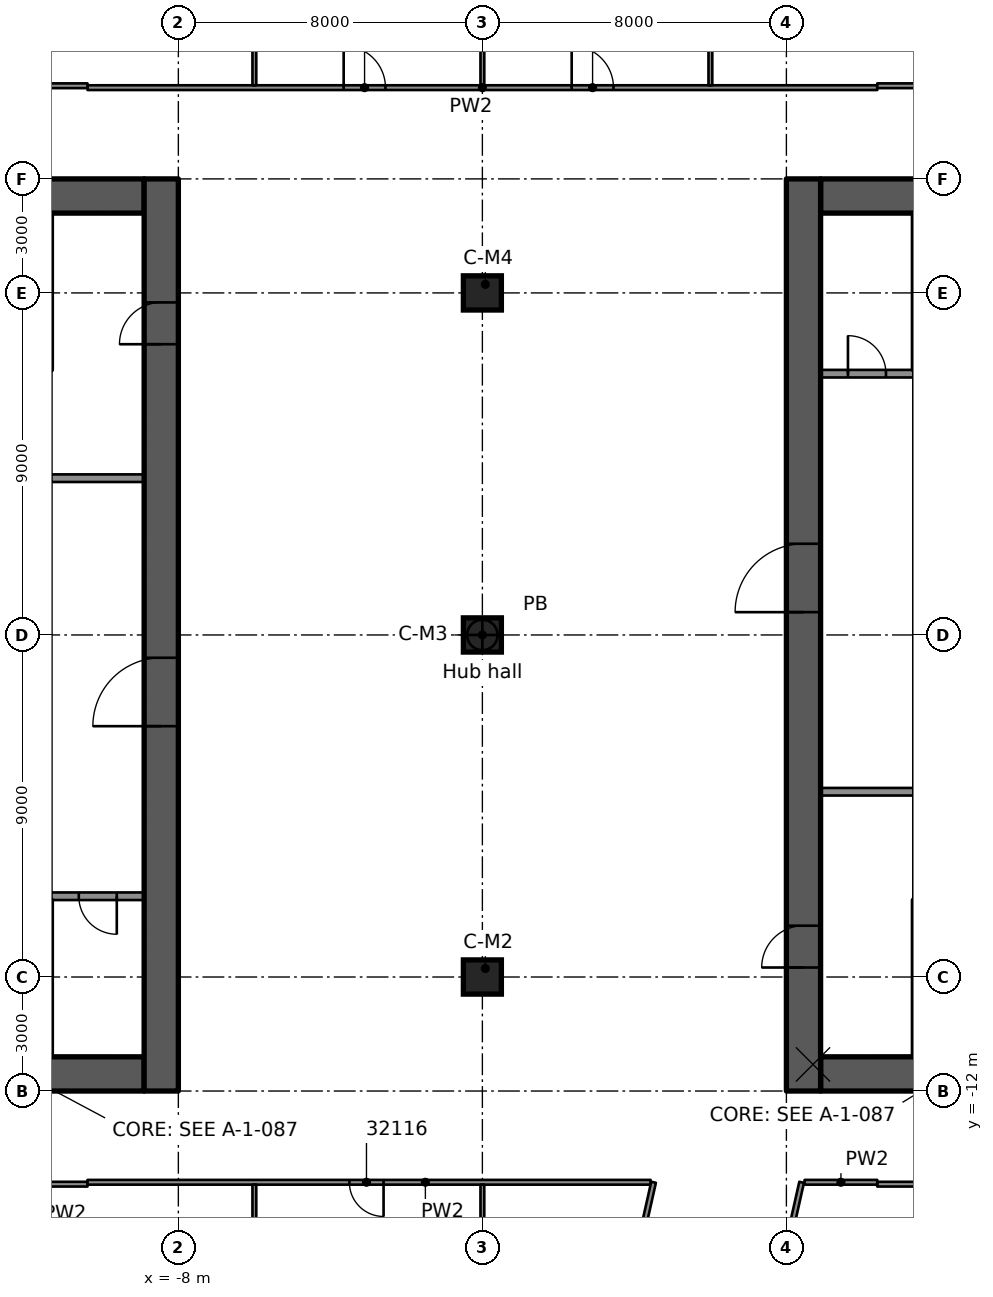
"""IFC4 building model, lengths in metres.
Left out: names, types, materials, properties, quantities, classifications, styles, units other than length and angle.
Written with IfcOpenShell. Run it as: python <this file> out.ifc"""

import sys

from ifc_helpers import new_model, si_unit, direction, frame, frame_2d, origin, origin_2d, place, context, subcontext, project, spatial, rectangle, extrude, element, fill, save


model = new_model("IFC4")
c1 = context("Model", 3, precision=1e-05, world=origin(), true_north=direction((0.0, 1.0)))
c2 = subcontext(c1, "Body", "Model", "MODEL_VIEW")
j1 = project(units=[si_unit("LENGTHUNIT", "METRE"), si_unit("PLANEANGLEUNIT", "RADIAN")], contexts=[c1])
p1 = place(None, origin())
s1 = spatial("IfcSite", under=j1, at=p1, CompositionType="ELEMENT")
p2 = place(p1, origin())
s2 = spatial("IfcBuilding", under=s1, at=p2, CompositionType="ELEMENT")
p3 = place(p2, frame((0.0, 0.0, 159.6)))
s3 = spatial("IfcBuildingStorey", under=s2, at=p3, CompositionType="ELEMENT", Elevation=159.6)
p4 = place(p3, frame((-18.1, 11.55, 0.0), z_axis=(0.0, 0.0, 1.0), x_axis=(1.0, 0.0, 0.0)))
e1 = element("IfcWall", 1, at=p4, inside=s3, PredefinedType="SHEAR", context=c2, shape_type="SweptSolid", body=[
    extrude(rectangle(XDim=9.2, YDim=0.9, at=frame_2d((4.6, 0.0))), origin(), (0.0, 0.0, 1.0), 3.5),
])
p5 = place(p4, frame((5.1, 0.0, 0.0)))
e2 = element("IfcOpeningElement", 2, at=p5, cuts=e1, PredefinedType="OPENING", context=c2, shape_type="SweptSolid", body=[
    extrude(rectangle(XDim=1.1, YDim=2.1, at=frame_2d((0.55, 1.05))), frame((0.0, 0.46, 0.0), z_axis=(0.0, -1.0, 0.0), x_axis=(1.0, 0.0, 0.0)), (0.0, 0.0, 1.0), 0.92),
])
p6 = place(p3, frame((-18.1, -11.55, 0.0), z_axis=(0.0, 0.0, 1.0), x_axis=(1.0, 0.0, 0.0)))
e3 = element("IfcWall", 3, at=p6, inside=s3, PredefinedType="SHEAR", context=c2, shape_type="SweptSolid", body=[
    extrude(rectangle(XDim=9.2, YDim=0.9, at=frame_2d((4.6, 0.0))), origin(), (0.0, 0.0, 1.0), 3.5),
])
p7 = place(p6, frame((5.1, 0.0, 0.0)))
e4 = element("IfcOpeningElement", 4, at=p7, cuts=e3, PredefinedType="OPENING", context=c2, shape_type="SweptSolid", body=[
    extrude(rectangle(XDim=1.1, YDim=2.1, at=frame_2d((0.55, 1.05))), frame((0.0, 0.46, 0.0), z_axis=(0.0, -1.0, 0.0), x_axis=(1.0, 0.0, 0.0)), (0.0, 0.0, 1.0), 0.92),
])
p8 = place(p3, frame((-8.45, -12.0, 0.0), z_axis=(0.0, 0.0, 1.0), x_axis=(0.0, 1.0, 0.0)))
e5 = element("IfcWall", 5, at=p8, inside=s3, PredefinedType="SHEAR", context=c2, shape_type="SweptSolid", body=[
    extrude(rectangle(XDim=24.0, YDim=0.9, at=frame_2d((12.0, 0.0))), origin(), (0.0, 0.0, 1.0), 3.5),
])
p9 = place(p8, frame((9.6, 0.0, 0.0)))
e6 = element("IfcOpeningElement", 6, at=p9, cuts=e5, PredefinedType="OPENING", context=c2, shape_type="SweptSolid", body=[
    extrude(rectangle(XDim=1.8, YDim=2.1, at=frame_2d((0.9, 1.05))), frame((0.0, 0.46, 0.0), z_axis=(0.0, -1.0, 0.0), x_axis=(1.0, 0.0, 0.0)), (0.0, 0.0, 1.0), 0.92),
])
p10 = place(p8, frame((19.65, 0.0, 0.0)))
e7 = element("IfcOpeningElement", 7, at=p10, cuts=e5, PredefinedType="OPENING", context=c2, shape_type="SweptSolid", body=[
    extrude(rectangle(XDim=1.1, YDim=2.1, at=frame_2d((0.55, 1.05))), frame((0.0, 0.46, 0.0), z_axis=(0.0, -1.0, 0.0), x_axis=(1.0, 0.0, 0.0)), (0.0, 0.0, 1.0), 0.92),
])
p11 = place(p3, frame((8.9, 11.55, 0.0), z_axis=(0.0, 0.0, 1.0), x_axis=(1.0, 0.0, 0.0)))
e8 = element("IfcWall", 8, at=p11, inside=s3, PredefinedType="SHEAR", context=c2, shape_type="SweptSolid", body=[
    extrude(rectangle(XDim=9.2, YDim=0.9, at=frame_2d((4.6, 0.0))), origin(), (0.0, 0.0, 1.0), 3.5),
])
p12 = place(p11, frame((3.0, 0.0, 0.0)))
e9 = element("IfcOpeningElement", 9, at=p12, cuts=e8, PredefinedType="OPENING", context=c2, shape_type="SweptSolid", body=[
    extrude(rectangle(XDim=1.1, YDim=2.1, at=frame_2d((0.55, 1.05))), frame((0.0, 0.46, 0.0), z_axis=(0.0, -1.0, 0.0), x_axis=(1.0, 0.0, 0.0)), (0.0, 0.0, 1.0), 0.92),
])
p13 = place(p3, frame((8.9, -11.55, 0.0), z_axis=(0.0, 0.0, 1.0), x_axis=(1.0, 0.0, 0.0)))
e10 = element("IfcWall", 10, at=p13, inside=s3, PredefinedType="SHEAR", context=c2, shape_type="SweptSolid", body=[
    extrude(rectangle(XDim=9.2, YDim=0.9, at=frame_2d((4.6, 0.0))), origin(), (0.0, 0.0, 1.0), 3.5),
])
p14 = place(p13, frame((3.0, 0.0, 0.0)))
e11 = element("IfcOpeningElement", 11, at=p14, cuts=e10, PredefinedType="OPENING", context=c2, shape_type="SweptSolid", body=[
    extrude(rectangle(XDim=1.1, YDim=2.1, at=frame_2d((0.55, 1.05))), frame((0.0, 0.46, 0.0), z_axis=(0.0, -1.0, 0.0), x_axis=(1.0, 0.0, 0.0)), (0.0, 0.0, 1.0), 0.92),
])
p15 = place(p3, frame((8.45, -12.0, 0.0), z_axis=(0.0, 0.0, 1.0), x_axis=(0.0, 1.0, 0.0)))
e12 = element("IfcWall", 12, at=p15, inside=s3, PredefinedType="SHEAR", context=c2, shape_type="SweptSolid", body=[
    extrude(rectangle(XDim=24.0, YDim=0.9, at=frame_2d((12.0, 0.0))), origin(), (0.0, 0.0, 1.0), 3.5),
])
p16 = place(p15, frame((12.6, 0.0, 0.0)))
e13 = element("IfcOpeningElement", 13, at=p16, cuts=e12, PredefinedType="OPENING", context=c2, shape_type="SweptSolid", body=[
    extrude(rectangle(XDim=1.8, YDim=2.1, at=frame_2d((0.9, 1.05))), frame((0.0, 0.46, 0.0), z_axis=(0.0, -1.0, 0.0), x_axis=(1.0, 0.0, 0.0)), (0.0, 0.0, 1.0), 0.92),
])
p17 = place(p15, frame((3.25, 0.0, 0.0)))
e14 = element("IfcOpeningElement", 14, at=p17, cuts=e12, PredefinedType="OPENING", context=c2, shape_type="SweptSolid", body=[
    extrude(rectangle(XDim=1.1, YDim=2.1, at=frame_2d((0.55, 1.05))), frame((0.0, 0.46, 0.0), z_axis=(0.0, -1.0, 0.0), x_axis=(1.0, 0.0, 0.0)), (0.0, 0.0, 1.0), 0.92),
])
for number, where, z_axis, x_axis in (
    (15, (0.0, -9.0, 0.0), (0.0, 0.0, 1.0), (1.0, 0.0, 0.0)),
    (16, (0.0, 0.0, 0.0), (0.0, 0.0, 1.0), (1.0, 0.0, 0.0)),
    (17, (0.0, 9.0, 0.0), (0.0, 0.0, 1.0), (1.0, 0.0, 0.0)),
):
    element("IfcColumn", number, at=place(p3, frame(where, z_axis=z_axis, x_axis=x_axis)), inside=s3, PredefinedType="COLUMN", context=c2, shape_type="SweptSolid", body=[
        extrude(rectangle(XDim=1.0, YDim=0.9, at=origin_2d()), origin(), (0.0, 0.0, 1.0), 3.5),
    ])
p18 = place(p3, frame((-8.9, 4.125, 0.0), z_axis=(0.0, 0.0, 1.0), x_axis=(-1.0, 0.0, 0.0)))
e18 = element("IfcWall", 18, at=p18, inside=s3, PredefinedType="PARTITIONING", context=c2, shape_type="SweptSolid", body=[
    extrude(rectangle(XDim=2.44, YDim=0.2, at=frame_2d((1.22, 0.0))), origin(), (0.0, 0.0, 1.0), 3.09),
])
p19 = place(p3, frame((-8.9, -6.875, 0.0), z_axis=(0.0, 0.0, 1.0), x_axis=(-1.0, 0.0, 0.0)))
e19 = element("IfcWall", 19, at=p19, inside=s3, PredefinedType="PARTITIONING", context=c2, shape_type="SweptSolid", body=[
    extrude(rectangle(XDim=2.44, YDim=0.2, at=frame_2d((1.22, 0.0))), origin(), (0.0, 0.0, 1.0), 3.09),
])
p20 = place(p19, frame((0.72, 0.0, 0.0)))
e20 = element("IfcOpeningElement", 20, at=p20, cuts=e19, PredefinedType="OPENING", context=c2, shape_type="SweptSolid", body=[
    extrude(rectangle(XDim=1.0, YDim=2.1, at=frame_2d((0.5, 1.05))), frame((0.0, 0.11, 0.0), z_axis=(0.0, -1.0, 0.0), x_axis=(1.0, 0.0, 0.0)), (0.0, 0.0, 1.0), 0.22),
])
p21 = place(p3, frame((8.9, -4.125, 0.0), z_axis=(0.0, 0.0, 1.0), x_axis=(1.0, 0.0, 0.0)))
e21 = element("IfcWall", 21, at=p21, inside=s3, PredefinedType="PARTITIONING", context=c2, shape_type="SweptSolid", body=[
    extrude(rectangle(XDim=2.44, YDim=0.2, at=frame_2d((1.22, 0.0))), origin(), (0.0, 0.0, 1.0), 3.09),
])
p22 = place(p3, frame((8.9, 6.875, 0.0), z_axis=(0.0, 0.0, 1.0), x_axis=(1.0, 0.0, 0.0)))
e22 = element("IfcWall", 22, at=p22, inside=s3, PredefinedType="PARTITIONING", context=c2, shape_type="SweptSolid", body=[
    extrude(rectangle(XDim=2.44, YDim=0.2, at=frame_2d((1.22, 0.0))), origin(), (0.0, 0.0, 1.0), 3.09),
])
p23 = place(p22, frame((0.72, 0.0, 0.0)))
e23 = element("IfcOpeningElement", 23, at=p23, cuts=e22, PredefinedType="OPENING", context=c2, shape_type="SweptSolid", body=[
    extrude(rectangle(XDim=1.0, YDim=2.1, at=frame_2d((0.5, 1.05))), frame((0.0, 0.11, 0.0), z_axis=(0.0, -1.0, 0.0), x_axis=(1.0, 0.0, 0.0)), (0.0, 0.0, 1.0), 0.22),
])
p24 = place(p3, frame((-10.391, -14.451, 0.0), z_axis=(0.0, 0.0, 1.0), x_axis=(-1.0, 0.0, 0.0)))
e24 = element("IfcWall", 24, at=p24, inside=s3, PredefinedType="PARTITIONING", context=c2, shape_type="SweptSolid", body=[
    extrude(rectangle(XDim=5.043, YDim=0.125, at=frame_2d((2.521, 0.0))), origin(), (0.0, 0.0, 1.0), 3.08),
])
p25 = place(p24, frame((2.1, 0.0, 0.0)))
e25 = element("IfcOpeningElement", 25, at=p25, cuts=e24, PredefinedType="OPENING", context=c2, shape_type="SweptSolid", body=[
    extrude(rectangle(XDim=0.9, YDim=2.1, at=frame_2d((0.45, 1.05))), frame((0.0, 0.073, 0.0), z_axis=(0.0, -1.0, 0.0), x_axis=(1.0, 0.0, 0.0)), (0.0, 0.0, 1.0), 0.145),
])
p26 = place(p3, frame((21.387, -14.451, 0.0), z_axis=(0.0, 0.0, 1.0), x_axis=(-1.0, 0.0, 0.0)))
e26 = element("IfcWall", 26, at=p26, inside=s3, PredefinedType="PARTITIONING", context=c2, shape_type="SweptSolid", body=[
    extrude(rectangle(XDim=10.996, YDim=0.125, at=frame_2d((5.498, 0.0))), origin(), (0.0, 0.0, 1.0), 3.08),
])
p27 = place(p26, frame((5.238, 0.0, 0.0)))
e27 = element("IfcOpeningElement", 27, at=p27, cuts=e26, PredefinedType="OPENING", context=c2, shape_type="SweptSolid", body=[
    extrude(rectangle(XDim=1.8, YDim=2.1, at=frame_2d((0.9, 1.05))), frame((0.0, 0.073, 0.0), z_axis=(0.0, -1.0, 0.0), x_axis=(1.0, 0.0, 0.0)), (0.0, 0.0, 1.0), 0.145),
])
p28 = place(p3, frame((4.427, -14.401, 0.0), z_axis=(0.0, 0.0, 1.0), x_axis=(-1.0, 0.0, 0.0)))
e28 = element("IfcWall", 28, at=p28, inside=s3, PredefinedType="PARTITIONING", context=c2, shape_type="SweptSolid", body=[
    extrude(rectangle(XDim=14.817, YDim=0.125, at=frame_2d((7.408, 0.0))), origin(), (0.0, 0.0, 1.0), 3.08),
])
p29 = place(p28, frame((7.027, 0.0, 0.0)))
e29 = element("IfcOpeningElement", 29, at=p29, cuts=e28, PredefinedType="OPENING", context=c2, shape_type="SweptSolid", body=[
    extrude(rectangle(XDim=0.9, YDim=2.1, at=frame_2d((0.45, 1.05))), frame((0.0, 0.073, 0.0), z_axis=(0.0, -1.0, 0.0), x_axis=(1.0, 0.0, 0.0)), (0.0, 0.0, 1.0), 0.145),
])
p30 = place(p3, frame((8.479, -14.401, 0.0), z_axis=(0.0, 0.0, 1.0), x_axis=(1.0, 0.0, 0.0)))
e30 = element("IfcWall", 30, at=p30, inside=s3, PredefinedType="PARTITIONING", context=c2, shape_type="SweptSolid", body=[
    extrude(rectangle(XDim=1.912, YDim=0.125, at=frame_2d((0.956, 0.0))), origin(), (0.0, 0.0, 1.0), 3.08),
])
p31 = place(p3, frame((-10.39, 14.401, 0.0), z_axis=(0.0, 0.0, 1.0), x_axis=(1.0, 0.0, 0.0)))
e31 = element("IfcWall", 31, at=p31, inside=s3, PredefinedType="PARTITIONING", context=c2, shape_type="SweptSolid", body=[
    extrude(rectangle(XDim=20.781, YDim=0.125, at=frame_2d((10.391, 0.0))), origin(), (0.0, 0.0, 1.0), 3.08),
])
p32 = place(p31, frame((12.74, 0.0, 0.0)))
e32 = element("IfcOpeningElement", 32, at=p32, cuts=e31, PredefinedType="OPENING", context=c2, shape_type="SweptSolid", body=[
    extrude(rectangle(XDim=1.1, YDim=2.1, at=frame_2d((0.55, 1.05))), frame((0.0, 0.073, 0.0), z_axis=(0.0, -1.0, 0.0), x_axis=(1.0, 0.0, 0.0)), (0.0, 0.0, 1.0), 0.145),
])
p33 = place(p31, frame((6.74, 0.0, 0.0)))
e33 = element("IfcOpeningElement", 33, at=p33, cuts=e31, PredefinedType="OPENING", context=c2, shape_type="SweptSolid", body=[
    extrude(rectangle(XDim=1.1, YDim=2.1, at=frame_2d((0.55, 1.05))), frame((0.0, 0.073, 0.0), z_axis=(0.0, -1.0, 0.0), x_axis=(1.0, 0.0, 0.0)), (0.0, 0.0, 1.0), 0.145),
])
p34 = place(p3, frame((-21.387, 14.451, 0.0), z_axis=(0.0, 0.0, 1.0), x_axis=(1.0, 0.0, 0.0)))
e34 = element("IfcWall", 34, at=p34, inside=s3, PredefinedType="PARTITIONING", context=c2, shape_type="SweptSolid", body=[
    extrude(rectangle(XDim=10.996, YDim=0.125, at=frame_2d((5.498, 0.0))), origin(), (0.0, 0.0, 1.0), 3.08),
])
p35 = place(p34, frame((5.238, 0.0, 0.0)))
e35 = element("IfcOpeningElement", 35, at=p35, cuts=e34, PredefinedType="OPENING", context=c2, shape_type="SweptSolid", body=[
    extrude(rectangle(XDim=1.8, YDim=2.1, at=frame_2d((0.9, 1.05))), frame((0.0, 0.073, 0.0), z_axis=(0.0, -1.0, 0.0), x_axis=(1.0, 0.0, 0.0)), (0.0, 0.0, 1.0), 0.145),
])
p36 = place(p3, frame((10.391, 14.451, 0.0), z_axis=(0.0, 0.0, 1.0), x_axis=(1.0, 0.0, 0.0)))
e36 = element("IfcWall", 36, at=p36, inside=s3, PredefinedType="PARTITIONING", context=c2, shape_type="SweptSolid", body=[
    extrude(rectangle(XDim=10.996, YDim=0.125, at=frame_2d((5.498, 0.0))), origin(), (0.0, 0.0, 1.0), 3.08),
])
p37 = place(p36, frame((3.85, 0.0, 0.0)))
e37 = element("IfcOpeningElement", 37, at=p37, cuts=e36, PredefinedType="OPENING", context=c2, shape_type="SweptSolid", body=[
    extrude(rectangle(XDim=1.8, YDim=2.1, at=frame_2d((0.9, 1.05))), frame((0.0, 0.073, 0.0), z_axis=(0.0, -1.0, 0.0), x_axis=(1.0, 0.0, 0.0)), (0.0, 0.0, 1.0), 0.145),
])
p38 = place(p3, frame((8.401, -14.401, 0.0), z_axis=(0.0, 0.0, 1.0), x_axis=(-0.218995507843, -0.975725867006, 0.0)))
e38 = element("IfcWall", 38, at=p38, inside=s3, PredefinedType="PARTITIONING", context=c2, shape_type="SweptSolid", body=[
    extrude(rectangle(XDim=10.963, YDim=0.125, at=frame_2d((5.481, 0.0))), origin(), (0.0, 0.0, 1.0), 3.08),
])
p39 = place(p3, frame((3.86, -17.274, 0.0), z_axis=(0.0, 0.0, 1.0), x_axis=(0.218975515368, 0.975730353976, 0.0)))
e39 = element("IfcWall", 39, at=p39, inside=s3, PredefinedType="PARTITIONING", context=c2, shape_type="SweptSolid", body=[
    extrude(rectangle(XDim=2.945, YDim=0.125, at=frame_2d((1.472, 0.0))), origin(), (0.0, 0.0, 1.0), 3.08),
])
p40 = place(p3, frame((6.0, 14.463, 0.0), z_axis=(0.0, 0.0, 1.0), x_axis=(0.0, 1.0, 0.0)))
e40 = element("IfcWall", 40, at=p40, inside=s3, PredefinedType="PARTITIONING", context=c2, shape_type="SweptSolid", body=[
    extrude(rectangle(XDim=15.187, YDim=0.1, at=frame_2d((7.594, 0.0))), origin(), (0.0, 0.0, 1.0), 3.08),
])
p41 = place(p3, frame((0.0, -32.297, 0.0), z_axis=(0.0, 0.0, 1.0), x_axis=(0.0, 1.0, 0.0)))
e41 = element("IfcWall", 41, at=p41, inside=s3, PredefinedType="PARTITIONING", context=c2, shape_type="SweptSolid", body=[
    extrude(rectangle(XDim=17.834, YDim=0.1, at=frame_2d((8.917, 0.0))), origin(), (0.0, 0.0, 1.0), 2.445),
])
p42 = place(p3, frame((0.0, 14.463, 0.0), z_axis=(0.0, 0.0, 1.0), x_axis=(0.0, 1.0, 0.0)))
e42 = element("IfcWall", 42, at=p42, inside=s3, PredefinedType="PARTITIONING", context=c2, shape_type="SweptSolid", body=[
    extrude(rectangle(XDim=16.353, YDim=0.1, at=frame_2d((8.177, 0.0))), origin(), (0.0, 0.0, 1.0), 2.445),
])
p43 = place(p3, frame((-6.0, -30.29, 0.0), z_axis=(0.0, 0.0, 1.0), x_axis=(0.0, 1.0, 0.0)))
e43 = element("IfcWall", 43, at=p43, inside=s3, PredefinedType="PARTITIONING", context=c2, shape_type="SweptSolid", body=[
    extrude(rectangle(XDim=15.827, YDim=0.1, at=frame_2d((7.914, 0.0))), origin(), (0.0, 0.0, 1.0), 3.08),
])
p44 = place(p3, frame((-6.0, 14.463, 0.0), z_axis=(0.0, 0.0, 1.0), x_axis=(0.0, 1.0, 0.0)))
e44 = element("IfcWall", 44, at=p44, inside=s3, PredefinedType="PARTITIONING", context=c2, shape_type="SweptSolid", body=[
    extrude(rectangle(XDim=17.519, YDim=0.1, at=frame_2d((8.76, 0.0))), origin(), (0.0, 0.0, 1.0), 2.445),
])
p45 = place(p9, origin())
e45 = element("IfcDoor", 45, at=p45, inside=s3, OperationType="SINGLE_SWING_LEFT", PredefinedType="DOOR", context=c2, shape_type="SweptSolid", body=[
    extrude(rectangle(XDim=1.8, YDim=2.1, at=frame_2d((0.9, 1.05))), frame((0.0, 0.025, 0.0), z_axis=(0.0, -1.0, 0.0), x_axis=(1.0, 0.0, 0.0)), (0.0, 0.0, 1.0), 0.05),
])
fill(e6, e45)
p46 = place(p10, origin())
e46 = element("IfcDoor", 46, at=p46, inside=s3, OperationType="SINGLE_SWING_RIGHT", PredefinedType="DOOR", context=c2, shape_type="SweptSolid", body=[
    extrude(rectangle(XDim=1.1, YDim=2.1, at=frame_2d((0.55, 1.05))), frame((0.0, 0.025, 0.0), z_axis=(0.0, -1.0, 0.0), x_axis=(1.0, 0.0, 0.0)), (0.0, 0.0, 1.0), 0.05),
])
fill(e7, e46)
p47 = place(p20, origin())
e47 = element("IfcDoor", 47, at=p47, inside=s3, OperationType="SINGLE_SWING_RIGHT", PredefinedType="DOOR", context=c2, shape_type="SweptSolid", body=[
    extrude(rectangle(XDim=1.0, YDim=2.1, at=frame_2d((0.5, 1.05))), frame((0.0, 0.025, 0.0), z_axis=(0.0, -1.0, 0.0), x_axis=(1.0, 0.0, 0.0)), (0.0, 0.0, 1.0), 0.05),
])
fill(e20, e47)
p48 = place(p16, origin())
e48 = element("IfcDoor", 48, at=p48, inside=s3, OperationType="SINGLE_SWING_RIGHT", PredefinedType="DOOR", context=c2, shape_type="SweptSolid", body=[
    extrude(rectangle(XDim=1.8, YDim=2.1, at=frame_2d((0.9, 1.05))), frame((0.0, 0.025, 0.0), z_axis=(0.0, -1.0, 0.0), x_axis=(1.0, 0.0, 0.0)), (0.0, 0.0, 1.0), 0.05),
])
fill(e13, e48)
p49 = place(p17, origin())
e49 = element("IfcDoor", 49, at=p49, inside=s3, OperationType="SINGLE_SWING_LEFT", PredefinedType="DOOR", context=c2, shape_type="SweptSolid", body=[
    extrude(rectangle(XDim=1.1, YDim=2.1, at=frame_2d((0.55, 1.05))), frame((0.0, 0.025, 0.0), z_axis=(0.0, -1.0, 0.0), x_axis=(1.0, 0.0, 0.0)), (0.0, 0.0, 1.0), 0.05),
])
fill(e14, e49)
p50 = place(p23, origin())
e50 = element("IfcDoor", 50, at=p50, inside=s3, OperationType="SINGLE_SWING_RIGHT", PredefinedType="DOOR", context=c2, shape_type="SweptSolid", body=[
    extrude(rectangle(XDim=1.0, YDim=2.1, at=frame_2d((0.5, 1.05))), frame((0.0, 0.025, 0.0), z_axis=(0.0, -1.0, 0.0), x_axis=(1.0, 0.0, 0.0)), (0.0, 0.0, 1.0), 0.05),
])
fill(e23, e50)
p51 = place(p29, origin())
e51 = element("IfcDoor", 51, at=p51, inside=s3, OperationType="SINGLE_SWING_RIGHT", PredefinedType="DOOR", context=c2, shape_type="SweptSolid", body=[
    extrude(rectangle(XDim=0.9, YDim=2.1, at=frame_2d((0.45, 1.05))), frame((0.0, 0.025, 0.0), z_axis=(0.0, -1.0, 0.0), x_axis=(1.0, 0.0, 0.0)), (0.0, 0.0, 1.0), 0.05),
])
fill(e29, e51)
p52 = place(p32, origin())
e52 = element("IfcDoor", 52, at=p52, inside=s3, OperationType="SINGLE_SWING_RIGHT", PredefinedType="DOOR", context=c2, shape_type="SweptSolid", body=[
    extrude(rectangle(XDim=1.1, YDim=2.1, at=frame_2d((0.55, 1.05))), frame((0.0, 0.025, 0.0), z_axis=(0.0, -1.0, 0.0), x_axis=(1.0, 0.0, 0.0)), (0.0, 0.0, 1.0), 0.05),
])
fill(e32, e52)
p53 = place(p33, origin())
e53 = element("IfcDoor", 53, at=p53, inside=s3, OperationType="SINGLE_SWING_LEFT", PredefinedType="DOOR", context=c2, shape_type="SweptSolid", body=[
    extrude(rectangle(XDim=1.1, YDim=2.1, at=frame_2d((0.55, 1.05))), frame((0.0, 0.025, 0.0), z_axis=(0.0, -1.0, 0.0), x_axis=(1.0, 0.0, 0.0)), (0.0, 0.0, 1.0), 0.05),
])
fill(e33, e53)
save(model, sys.argv[1])
